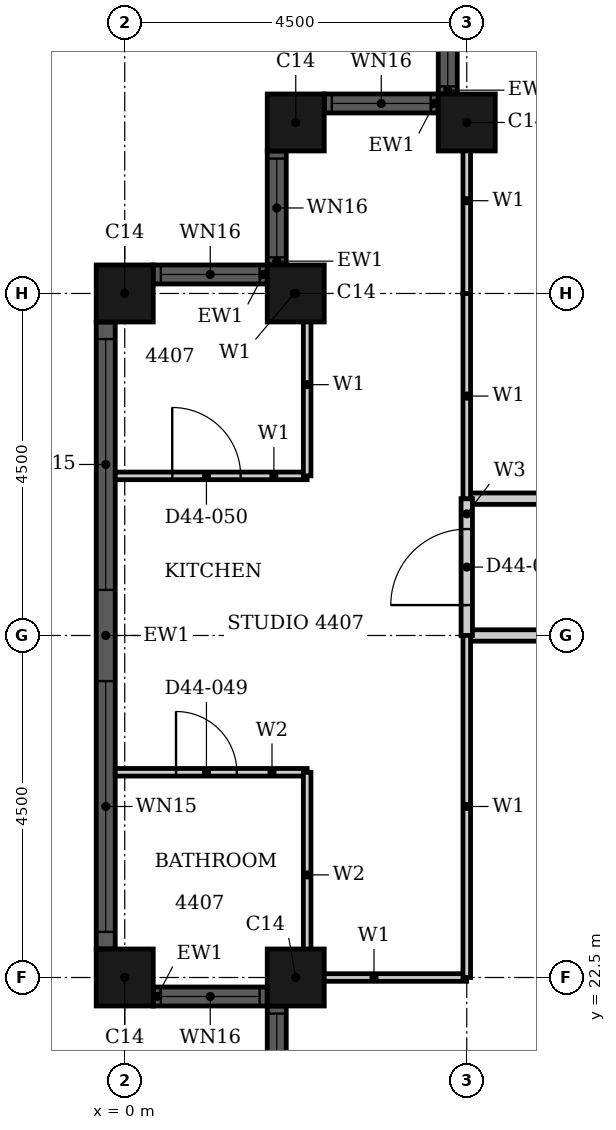
"""IFC4 building model, lengths in metres.
Left out: names, types, materials, properties, quantities, classifications, styles, units other than length and angle.
Written with IfcOpenShell. Run it as: python <this file> out.ifc"""

import sys

from ifc_helpers import new_model, si_unit, direction, frame, frame_2d, origin, origin_2d, place, context, subcontext, project, spatial, rectangle, hollow_rectangle, extrude, element, fill, save


model = new_model("IFC4")
c1 = context("Model", 3, precision=1e-05, world=origin(), true_north=direction((0.0, 1.0)))
c2 = subcontext(c1, "Body", "Model", "MODEL_VIEW")
j1 = project(units=[si_unit("LENGTHUNIT", "METRE"), si_unit("PLANEANGLEUNIT", "RADIAN")], contexts=[c1])
p1 = place(None, origin())
s1 = spatial("IfcSite", under=j1, at=p1, CompositionType="ELEMENT")
p2 = place(p1, origin())
s2 = spatial("IfcBuilding", under=s1, at=p2, CompositionType="ELEMENT")
p3 = place(p2, frame((0.0, 0.0, 176.5)))
s3 = spatial("IfcBuildingStorey", under=s2, at=p3, CompositionType="ELEMENT", Elevation=176.5)
for number, where, z_axis, x_axis in (
    (1, (4.5, 33.75, 0.0), (0.0, 0.0, 1.0), (1.0, 0.0, 0.0)),
    (2, (2.25, 33.75, 0.0), (0.0, 0.0, 1.0), (1.0, 0.0, 0.0)),
    (3, (2.25, 31.5, 0.0), (0.0, 0.0, 1.0), (1.0, 0.0, 0.0)),
    (4, (0.0, 31.5, 0.0), (0.0, 0.0, 1.0), (1.0, 0.0, 0.0)),
    (5, (0.0, 22.5, 0.0), (0.0, 0.0, 1.0), (1.0, 0.0, 0.0)),
    (6, (2.25, 22.5, 0.0), (0.0, 0.0, 1.0), (1.0, 0.0, 0.0)),
):
    element("IfcColumn", number, at=place(p3, frame(where, z_axis=z_axis, x_axis=x_axis)), inside=s3, PredefinedType="COLUMN", context=c2, shape_type="SweptSolid", body=[
        extrude(hollow_rectangle(XDim=0.75, YDim=0.75, WallThickness=0.024, at=origin_2d()), origin(), (0.0, 0.0, 1.0), 3.7),
    ])
p4 = place(p3, frame((4.25, 35.625, 0.0), z_axis=(0.0, 0.0, 1.0), x_axis=(0.0, -1.0, 0.0)))
e7 = element("IfcWall", 7, at=p4, inside=s3, PredefinedType="SOLIDWALL", context=c2, shape_type="SweptSolid", body=[
    extrude(rectangle(XDim=1.5, YDim=0.25, at=frame_2d((0.75, 0.0))), origin(), (0.0, 0.0, 1.0), 3.7),
])
p5 = place(p4, frame((0.1, 0.0, 0.9)))
e8 = element("IfcOpeningElement", 8, at=p5, cuts=e7, PredefinedType="OPENING", context=c2, shape_type="SweptSolid", body=[
    extrude(rectangle(XDim=1.3, YDim=1.85, at=frame_2d((0.65, 0.925))), frame((0.0, 0.135, 0.0), z_axis=(0.0, -1.0, 0.0), x_axis=(1.0, 0.0, 0.0)), (0.0, 0.0, 1.0), 0.27),
])
p6 = place(p3, frame((4.125, 34.0, 0.0), z_axis=(0.0, 0.0, 1.0), x_axis=(-1.0, 0.0, 0.0)))
e9 = element("IfcWall", 9, at=p6, inside=s3, PredefinedType="SOLIDWALL", context=c2, shape_type="SweptSolid", body=[
    extrude(rectangle(XDim=1.5, YDim=0.25, at=frame_2d((0.75, 0.0))), origin(), (0.0, 0.0, 1.0), 3.7),
])
p7 = place(p6, frame((0.1, 0.0, 0.9)))
e10 = element("IfcOpeningElement", 10, at=p7, cuts=e9, PredefinedType="OPENING", context=c2, shape_type="SweptSolid", body=[
    extrude(rectangle(XDim=1.3, YDim=1.85, at=frame_2d((0.65, 0.925))), frame((0.0, 0.135, 0.0), z_axis=(0.0, -1.0, 0.0), x_axis=(1.0, 0.0, 0.0)), (0.0, 0.0, 1.0), 0.27),
])
p8 = place(p3, frame((2.0, 33.375, 0.0), z_axis=(0.0, 0.0, 1.0), x_axis=(0.0, -1.0, 0.0)))
e11 = element("IfcWall", 11, at=p8, inside=s3, PredefinedType="SOLIDWALL", context=c2, shape_type="SweptSolid", body=[
    extrude(rectangle(XDim=1.5, YDim=0.25, at=frame_2d((0.75, 0.0))), origin(), (0.0, 0.0, 1.0), 3.7),
])
p9 = place(p8, frame((0.1, 0.0, 0.9)))
e12 = element("IfcOpeningElement", 12, at=p9, cuts=e11, PredefinedType="OPENING", context=c2, shape_type="SweptSolid", body=[
    extrude(rectangle(XDim=1.3, YDim=1.85, at=frame_2d((0.65, 0.925))), frame((0.0, 0.135, 0.0), z_axis=(0.0, -1.0, 0.0), x_axis=(1.0, 0.0, 0.0)), (0.0, 0.0, 1.0), 0.27),
])
p10 = place(p3, frame((1.875, 31.75, 0.0), z_axis=(0.0, 0.0, 1.0), x_axis=(-1.0, 0.0, 0.0)))
e13 = element("IfcWall", 13, at=p10, inside=s3, PredefinedType="SOLIDWALL", context=c2, shape_type="SweptSolid", body=[
    extrude(rectangle(XDim=1.5, YDim=0.25, at=frame_2d((0.75, 0.0))), origin(), (0.0, 0.0, 1.0), 3.7),
])
p11 = place(p10, frame((0.1, 0.0, 0.9)))
e14 = element("IfcOpeningElement", 14, at=p11, cuts=e13, PredefinedType="OPENING", context=c2, shape_type="SweptSolid", body=[
    extrude(rectangle(XDim=1.3, YDim=1.85, at=frame_2d((0.65, 0.925))), frame((0.0, 0.135, 0.0), z_axis=(0.0, -1.0, 0.0), x_axis=(1.0, 0.0, 0.0)), (0.0, 0.0, 1.0), 0.27),
])
p12 = place(p3, frame((-0.25, 31.125, 0.0), z_axis=(0.0, 0.0, 1.0), x_axis=(0.0, -1.0, 0.0)))
e15 = element("IfcWall", 15, at=p12, inside=s3, PredefinedType="SOLIDWALL", context=c2, shape_type="SweptSolid", body=[
    extrude(rectangle(XDim=8.25, YDim=0.25, at=frame_2d((4.125, 0.0))), origin(), (0.0, 0.0, 1.0), 3.7),
])
p13 = place(p12, frame((0.225, 0.0, 0.45)))
e16 = element("IfcOpeningElement", 16, at=p13, cuts=e15, PredefinedType="OPENING", context=c2, shape_type="SweptSolid", body=[
    extrude(rectangle(XDim=3.3, YDim=2.3, at=frame_2d((1.65, 1.15))), frame((0.0, 0.135, 0.0), z_axis=(0.0, -1.0, 0.0), x_axis=(1.0, 0.0, 0.0)), (0.0, 0.0, 1.0), 0.27),
])
p14 = place(p12, frame((4.725, 0.0, 0.45)))
e17 = element("IfcOpeningElement", 17, at=p14, cuts=e15, PredefinedType="OPENING", context=c2, shape_type="SweptSolid", body=[
    extrude(rectangle(XDim=3.3, YDim=2.3, at=frame_2d((1.65, 1.15))), frame((0.0, 0.135, 0.0), z_axis=(0.0, -1.0, 0.0), x_axis=(1.0, 0.0, 0.0)), (0.0, 0.0, 1.0), 0.27),
])
p15 = place(p3, frame((0.375, 22.25, 0.0), z_axis=(0.0, 0.0, 1.0), x_axis=(1.0, 0.0, 0.0)))
e18 = element("IfcWall", 18, at=p15, inside=s3, PredefinedType="SOLIDWALL", context=c2, shape_type="SweptSolid", body=[
    extrude(rectangle(XDim=1.5, YDim=0.25, at=frame_2d((0.75, 0.0))), origin(), (0.0, 0.0, 1.0), 3.7),
])
p16 = place(p15, frame((0.1, 0.0, 0.9)))
e19 = element("IfcOpeningElement", 19, at=p16, cuts=e18, PredefinedType="OPENING", context=c2, shape_type="SweptSolid", body=[
    extrude(rectangle(XDim=1.3, YDim=1.85, at=frame_2d((0.65, 0.925))), frame((0.0, 0.135, 0.0), z_axis=(0.0, -1.0, 0.0), x_axis=(1.0, 0.0, 0.0)), (0.0, 0.0, 1.0), 0.27),
])
p17 = place(p3, frame((2.0, 22.125, 0.0), z_axis=(0.0, 0.0, 1.0), x_axis=(0.0, -1.0, 0.0)))
e20 = element("IfcWall", 20, at=p17, inside=s3, PredefinedType="SOLIDWALL", context=c2, shape_type="SweptSolid", body=[
    extrude(rectangle(XDim=1.5, YDim=0.25, at=frame_2d((0.75, 0.0))), origin(), (0.0, 0.0, 1.0), 3.7),
])
p18 = place(p17, frame((0.1, 0.0, 0.9)))
e21 = element("IfcOpeningElement", 21, at=p18, cuts=e20, PredefinedType="OPENING", context=c2, shape_type="SweptSolid", body=[
    extrude(rectangle(XDim=1.3, YDim=1.85, at=frame_2d((0.65, 0.925))), frame((0.0, 0.135, 0.0), z_axis=(0.0, -1.0, 0.0), x_axis=(1.0, 0.0, 0.0)), (0.0, 0.0, 1.0), 0.27),
])
p19 = place(p3, frame((4.5, 27.0, 0.0), z_axis=(0.0, 0.0, 1.0), x_axis=(1.0, 0.0, 0.0)))
e22 = element("IfcWall", 22, at=p19, inside=s3, PredefinedType="PARTITIONING", context=c2, shape_type="SweptSolid", body=[
    extrude(rectangle(XDim=13.5, YDim=0.15, at=frame_2d((6.75, 0.0))), origin(), (0.0, 0.0, 1.0), 2.68),
])
p20 = place(p19, frame((5.35, 0.0, 0.0)))
e23 = element("IfcOpeningElement", 23, at=p20, cuts=e22, PredefinedType="OPENING", context=c2, shape_type="SweptSolid", body=[
    extrude(rectangle(XDim=1.0, YDim=2.1, at=frame_2d((0.5, 1.05))), frame((0.0, 0.085, 0.0), z_axis=(0.0, -1.0, 0.0), x_axis=(1.0, 0.0, 0.0)), (0.0, 0.0, 1.0), 0.17),
])
p21 = place(p3, frame((4.5, 28.8, 0.0), z_axis=(0.0, 0.0, 1.0), x_axis=(1.0, 0.0, 0.0)))
e24 = element("IfcWall", 24, at=p21, inside=s3, PredefinedType="PARTITIONING", context=c2, shape_type="SweptSolid", body=[
    extrude(rectangle(XDim=11.699, YDim=0.15, at=frame_2d((5.85, 0.0))), origin(), (0.0, 0.0, 1.0), 3.4),
])
p22 = place(p21, frame((4.0, 0.0, 0.0)))
e25 = element("IfcOpeningElement", 25, at=p22, cuts=e24, PredefinedType="OPENING", context=c2, shape_type="SweptSolid", body=[
    extrude(rectangle(XDim=1.0, YDim=2.1, at=frame_2d((0.5, 1.05))), frame((0.0, 0.085, 0.0), z_axis=(0.0, -1.0, 0.0), x_axis=(1.0, 0.0, 0.0)), (0.0, 0.0, 1.0), 0.17),
])
p23 = place(p3, frame((4.5, 27.0, 0.0), z_axis=(0.0, 0.0, 1.0), x_axis=(0.0, 1.0, 0.0)))
e26 = element("IfcWall", 26, at=p23, inside=s3, PredefinedType="PARTITIONING", context=c2, shape_type="SweptSolid", body=[
    extrude(rectangle(XDim=1.8, YDim=0.15, at=frame_2d((0.9, 0.0))), origin(), (0.0, 0.0, 1.0), 3.4),
])
p24 = place(p23, frame((0.4, 0.0, 0.0)))
e27 = element("IfcOpeningElement", 27, at=p24, cuts=e26, PredefinedType="OPENING", context=c2, shape_type="SweptSolid", body=[
    extrude(rectangle(XDim=1.0, YDim=2.2, at=frame_2d((0.5, 1.1))), frame((0.0, 0.085, 0.0), z_axis=(0.0, -1.0, 0.0), x_axis=(1.0, 0.0, 0.0)), (0.0, 0.0, 1.0), 0.17),
])
p25 = place(p3, frame((2.06, 22.5, 0.0), z_axis=(0.0, 0.0, 1.0), x_axis=(1.0, 0.0, 0.0)))
e28 = element("IfcWall", 28, at=p25, inside=s3, PredefinedType="PARTITIONING", context=c2, shape_type="SweptSolid", body=[
    extrude(rectangle(XDim=2.439, YDim=0.1, at=frame_2d((1.219, 0.0))), origin(), (0.0, 0.0, 1.0), 2.68),
])
p26 = place(p3, frame((-0.125, 29.1, 0.0), z_axis=(0.0, 0.0, 1.0), x_axis=(1.0, 0.0, 0.0)))
e29 = element("IfcWall", 29, at=p26, inside=s3, PredefinedType="PARTITIONING", context=c2, shape_type="SweptSolid", body=[
    extrude(rectangle(XDim=2.525, YDim=0.1, at=frame_2d((1.262, 0.0))), origin(), (0.0, 0.0, 1.0), 3.4),
])
p27 = place(p26, frame((0.75, 0.0, 0.0)))
e30 = element("IfcOpeningElement", 30, at=p27, cuts=e29, PredefinedType="OPENING", context=c2, shape_type="SweptSolid", body=[
    extrude(rectangle(XDim=0.9, YDim=2.1, at=frame_2d((0.45, 1.05))), frame((0.0, 0.06, 0.0), z_axis=(0.0, -1.0, 0.0), x_axis=(1.0, 0.0, 0.0)), (0.0, 0.0, 1.0), 0.12),
])
p28 = place(p3, frame((2.06, 31.5, 0.0), z_axis=(0.0, 0.0, 1.0), x_axis=(1.0, 0.0, 0.0)))
e31 = element("IfcWall", 31, at=p28, inside=s3, PredefinedType="PARTITIONING", context=c2, shape_type="SweptSolid", body=[
    extrude(rectangle(XDim=0.34, YDim=0.1, at=frame_2d((0.17, 0.0))), origin(), (0.0, 0.0, 1.0), 3.4),
])
p29 = place(p3, frame((2.4, 29.1, 0.0), z_axis=(0.0, 0.0, 1.0), x_axis=(0.0, 1.0, 0.0)))
e32 = element("IfcWall", 32, at=p29, inside=s3, PredefinedType="PARTITIONING", context=c2, shape_type="SweptSolid", body=[
    extrude(rectangle(XDim=2.4, YDim=0.1, at=frame_2d((1.2, 0.0))), origin(), (0.0, 0.0, 1.0), 3.4),
])
p30 = place(p3, frame((4.5, 28.8, 0.0), z_axis=(0.0, 0.0, 1.0), x_axis=(0.0, 1.0, 0.0)))
e33 = element("IfcWall", 33, at=p30, inside=s3, PredefinedType="PARTITIONING", context=c2, shape_type="SweptSolid", body=[
    extrude(rectangle(XDim=2.7, YDim=0.1, at=frame_2d((1.35, 0.0))), origin(), (0.0, 0.0, 1.0), 3.4),
])
p31 = place(p3, frame((4.5, 31.501, 0.0), z_axis=(0.0, 0.0, 1.0), x_axis=(0.0, 1.0, 0.0)))
e34 = element("IfcWall", 34, at=p31, inside=s3, PredefinedType="PARTITIONING", context=c2, shape_type="SweptSolid", body=[
    extrude(rectangle(XDim=2.439, YDim=0.1, at=frame_2d((1.219, 0.0))), origin(), (0.0, 0.0, 1.0), 3.4),
])
p32 = place(p3, frame((4.5, 22.5, 0.0), z_axis=(0.0, 0.0, 1.0), x_axis=(0.0, 1.0, 0.0)))
e35 = element("IfcWall", 35, at=p32, inside=s3, PredefinedType="PARTITIONING", context=c2, shape_type="SweptSolid", body=[
    extrude(rectangle(XDim=4.5, YDim=0.1, at=frame_2d((2.25, 0.0))), origin(), (0.0, 0.0, 1.0), 3.4),
])
p33 = place(p3, frame((-0.125, 25.2, 0.0), z_axis=(0.0, 0.0, 1.0), x_axis=(1.0, 0.0, 0.0)))
e36 = element("IfcWall", 36, at=p33, inside=s3, PredefinedType="PARTITIONING", context=c2, shape_type="SweptSolid", body=[
    extrude(rectangle(XDim=2.525, YDim=0.1, at=frame_2d((1.262, 0.0))), origin(), (0.0, 0.0, 1.0), 3.4),
])
p34 = place(p33, frame((0.8, 0.0, 0.0)))
e37 = element("IfcOpeningElement", 37, at=p34, cuts=e36, PredefinedType="OPENING", context=c2, shape_type="SweptSolid", body=[
    extrude(rectangle(XDim=0.8, YDim=2.1, at=frame_2d((0.4, 1.05))), frame((0.0, 0.06, 0.0), z_axis=(0.0, -1.0, 0.0), x_axis=(1.0, 0.0, 0.0)), (0.0, 0.0, 1.0), 0.12),
])
p35 = place(p3, frame((2.4, 22.5, 0.0), z_axis=(0.0, 0.0, 1.0), x_axis=(0.0, 1.0, 0.0)))
e38 = element("IfcWall", 38, at=p35, inside=s3, PredefinedType="PARTITIONING", context=c2, shape_type="SweptSolid", body=[
    extrude(rectangle(XDim=2.7, YDim=0.1, at=frame_2d((1.35, 0.0))), origin(), (0.0, 0.0, 1.0), 3.4),
])
p36 = place(p5, origin())
e39 = element("IfcWindow", 39, at=p36, inside=s3, PartitioningType="SINGLE_PANEL", PredefinedType="WINDOW", context=c2, shape_type="SweptSolid", body=[
    extrude(rectangle(XDim=1.3, YDim=1.85, at=frame_2d((0.65, 0.925))), frame((0.0, 0.03, 0.0), z_axis=(0.0, -1.0, 0.0), x_axis=(1.0, 0.0, 0.0)), (0.0, 0.0, 1.0), 0.06),
])
fill(e8, e39)
p37 = place(p7, origin())
e40 = element("IfcWindow", 40, at=p37, inside=s3, PartitioningType="SINGLE_PANEL", PredefinedType="WINDOW", context=c2, shape_type="SweptSolid", body=[
    extrude(rectangle(XDim=1.3, YDim=1.85, at=frame_2d((0.65, 0.925))), frame((0.0, 0.03, 0.0), z_axis=(0.0, -1.0, 0.0), x_axis=(1.0, 0.0, 0.0)), (0.0, 0.0, 1.0), 0.06),
])
fill(e10, e40)
p38 = place(p9, origin())
e41 = element("IfcWindow", 41, at=p38, inside=s3, PartitioningType="SINGLE_PANEL", PredefinedType="WINDOW", context=c2, shape_type="SweptSolid", body=[
    extrude(rectangle(XDim=1.3, YDim=1.85, at=frame_2d((0.65, 0.925))), frame((0.0, 0.03, 0.0), z_axis=(0.0, -1.0, 0.0), x_axis=(1.0, 0.0, 0.0)), (0.0, 0.0, 1.0), 0.06),
])
fill(e12, e41)
p39 = place(p11, origin())
e42 = element("IfcWindow", 42, at=p39, inside=s3, PartitioningType="SINGLE_PANEL", PredefinedType="WINDOW", context=c2, shape_type="SweptSolid", body=[
    extrude(rectangle(XDim=1.3, YDim=1.85, at=frame_2d((0.65, 0.925))), frame((0.0, 0.03, 0.0), z_axis=(0.0, -1.0, 0.0), x_axis=(1.0, 0.0, 0.0)), (0.0, 0.0, 1.0), 0.06),
])
fill(e14, e42)
p40 = place(p13, origin())
e43 = element("IfcWindow", 43, at=p40, inside=s3, PartitioningType="SINGLE_PANEL", PredefinedType="WINDOW", context=c2, shape_type="SweptSolid", body=[
    extrude(rectangle(XDim=3.3, YDim=2.3, at=frame_2d((1.65, 1.15))), frame((0.0, 0.03, 0.0), z_axis=(0.0, -1.0, 0.0), x_axis=(1.0, 0.0, 0.0)), (0.0, 0.0, 1.0), 0.06),
])
fill(e16, e43)
p41 = place(p14, origin())
e44 = element("IfcWindow", 44, at=p41, inside=s3, PartitioningType="SINGLE_PANEL", PredefinedType="WINDOW", context=c2, shape_type="SweptSolid", body=[
    extrude(rectangle(XDim=3.3, YDim=2.3, at=frame_2d((1.65, 1.15))), frame((0.0, 0.03, 0.0), z_axis=(0.0, -1.0, 0.0), x_axis=(1.0, 0.0, 0.0)), (0.0, 0.0, 1.0), 0.06),
])
fill(e17, e44)
p42 = place(p16, origin())
e45 = element("IfcWindow", 45, at=p42, inside=s3, PartitioningType="SINGLE_PANEL", PredefinedType="WINDOW", context=c2, shape_type="SweptSolid", body=[
    extrude(rectangle(XDim=1.3, YDim=1.85, at=frame_2d((0.65, 0.925))), frame((0.0, 0.03, 0.0), z_axis=(0.0, -1.0, 0.0), x_axis=(1.0, 0.0, 0.0)), (0.0, 0.0, 1.0), 0.06),
])
fill(e19, e45)
p43 = place(p18, origin())
e46 = element("IfcWindow", 46, at=p43, inside=s3, PartitioningType="SINGLE_PANEL", PredefinedType="WINDOW", context=c2, shape_type="SweptSolid", body=[
    extrude(rectangle(XDim=1.3, YDim=1.85, at=frame_2d((0.65, 0.925))), frame((0.0, 0.03, 0.0), z_axis=(0.0, -1.0, 0.0), x_axis=(1.0, 0.0, 0.0)), (0.0, 0.0, 1.0), 0.06),
])
fill(e21, e46)
p44 = place(p24, origin())
e47 = element("IfcDoor", 47, at=p44, inside=s3, OperationType="SINGLE_SWING_LEFT", PredefinedType="DOOR", context=c2, shape_type="SweptSolid", body=[
    extrude(rectangle(XDim=1.0, YDim=2.2, at=frame_2d((0.5, 1.1))), frame((0.0, 0.025, 0.0), z_axis=(0.0, -1.0, 0.0), x_axis=(1.0, 0.0, 0.0)), (0.0, 0.0, 1.0), 0.05),
])
fill(e27, e47)
p45 = place(p34, origin())
e48 = element("IfcDoor", 48, at=p45, inside=s3, OperationType="SINGLE_SWING_RIGHT", PredefinedType="DOOR", context=c2, shape_type="SweptSolid", body=[
    extrude(rectangle(XDim=0.8, YDim=2.1, at=frame_2d((0.4, 1.05))), frame((0.0, 0.025, 0.0), z_axis=(0.0, -1.0, 0.0), x_axis=(1.0, 0.0, 0.0)), (0.0, 0.0, 1.0), 0.05),
])
fill(e37, e48)
p46 = place(p27, origin())
e49 = element("IfcDoor", 49, at=p46, inside=s3, OperationType="SINGLE_SWING_RIGHT", PredefinedType="DOOR", context=c2, shape_type="SweptSolid", body=[
    extrude(rectangle(XDim=0.9, YDim=2.1, at=frame_2d((0.45, 1.05))), frame((0.0, 0.025, 0.0), z_axis=(0.0, -1.0, 0.0), x_axis=(1.0, 0.0, 0.0)), (0.0, 0.0, 1.0), 0.05),
])
fill(e30, e49)
save(model, sys.argv[1])
